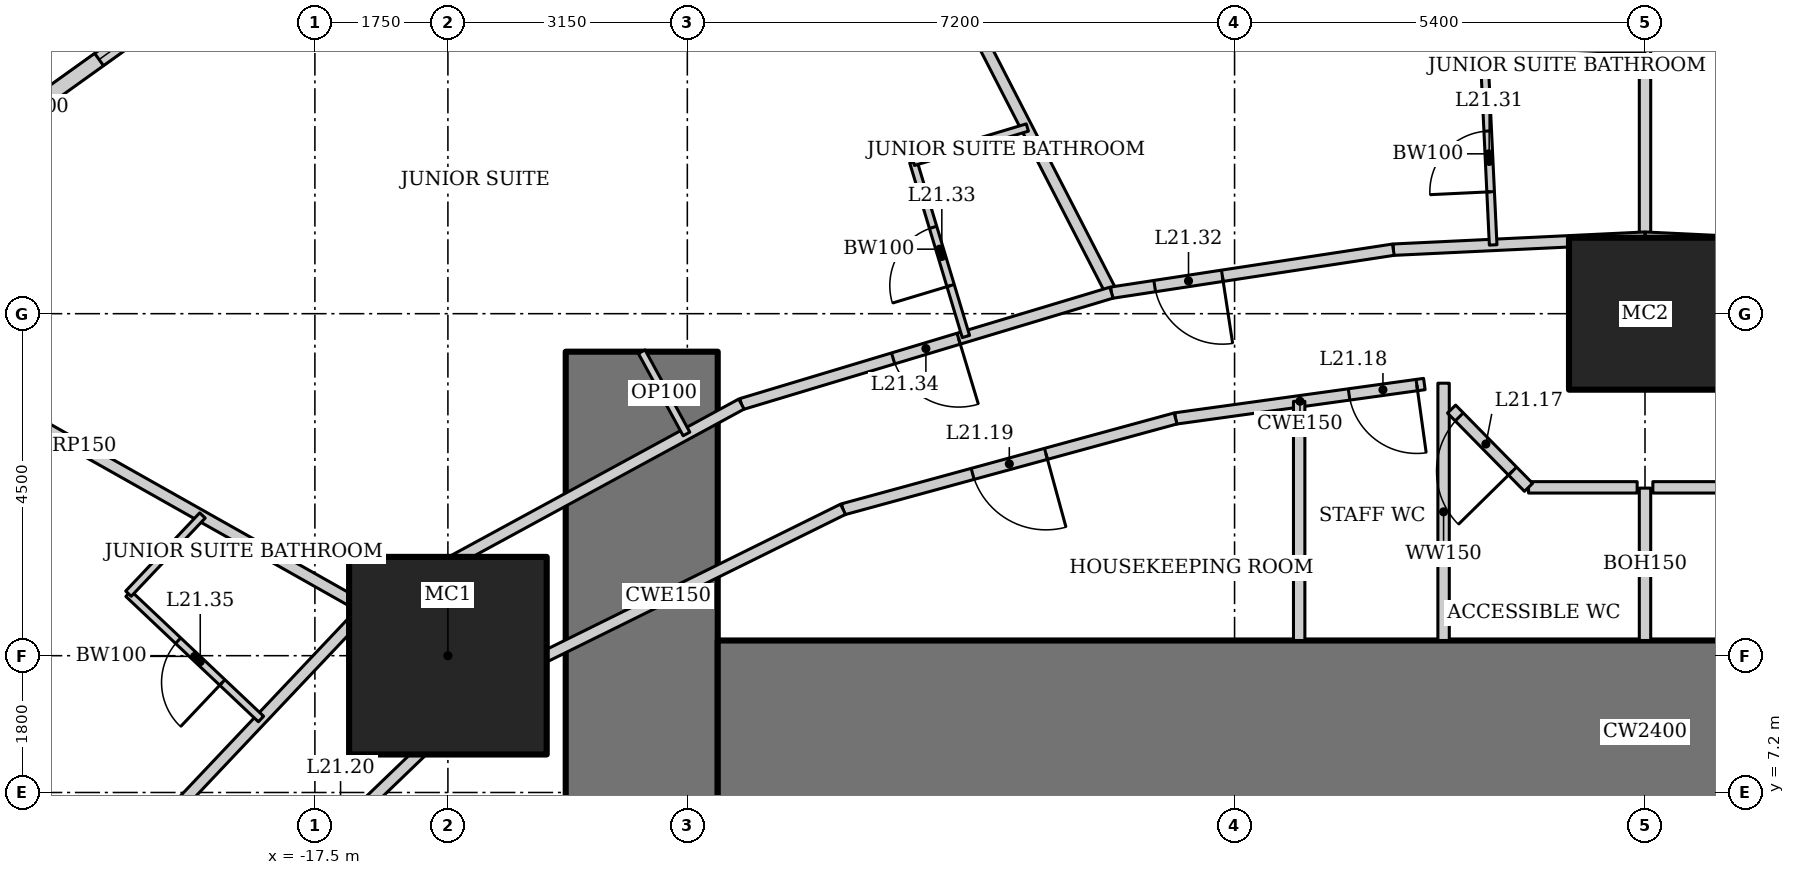
"""IFC4 building model, lengths in metres.
Left out: names, types, materials, properties, quantities, classifications, styles, units other than length and angle.
Written with IfcOpenShell. Run it as: python <this file> out.ifc"""

import sys

from ifc_helpers import new_model, si_unit, direction, frame, frame_2d, origin, origin_2d, place, context, subcontext, project, spatial, rectangle, hollow_rectangle, extrude, element, fill, save


model = new_model("IFC4")
c1 = context("Model", 3, precision=1e-05, world=origin(), true_north=direction((0.0, 1.0)))
c2 = subcontext(c1, "Body", "Model", "MODEL_VIEW")
j1 = project(units=[si_unit("LENGTHUNIT", "METRE"), si_unit("PLANEANGLEUNIT", "RADIAN")], contexts=[c1])
p1 = place(None, origin())
s1 = spatial("IfcSite", under=j1, at=p1, CompositionType="ELEMENT")
p2 = place(p1, origin())
s2 = spatial("IfcBuilding", under=s1, at=p2, CompositionType="ELEMENT")
p3 = place(p2, frame((0.0, 0.0, 91.0)))
s3 = spatial("IfcBuildingStorey", under=s2, at=p3, CompositionType="ELEMENT", Elevation=91.0)
p4 = place(p3, frame((0.0, 13.5, 0.0), z_axis=(0.0, 0.0, 1.0), x_axis=(1.0, 0.0, 0.0)))
e1 = element("IfcColumn", 1, at=p4, inside=s3, PredefinedType="COLUMN", context=c2, shape_type="SweptSolid", body=[
    extrude(hollow_rectangle(XDim=2.0, YDim=2.0, WallThickness=0.17, at=origin_2d()), origin(), (0.0, 0.0, 1.0), 3.6),
])
p5 = place(p3, frame((-15.75, 9.0, 0.0), z_axis=(0.0, 0.0, 1.0), x_axis=(1.0, 0.0, 0.0)))
e2 = element("IfcColumn", 2, at=p5, inside=s3, PredefinedType="COLUMN", context=c2, shape_type="SweptSolid", body=[
    extrude(hollow_rectangle(XDim=2.6, YDim=2.6, WallThickness=0.13, at=origin_2d()), origin(), (0.0, 0.0, 1.0), 3.6),
])
p6 = place(p3, frame((-13.2, 13.0, 0.0), z_axis=(0.0, 0.0, 1.0), x_axis=(0.0, -1.0, 0.0)))
e3 = element("IfcWall", 3, at=p6, inside=s3, PredefinedType="SHEAR", context=c2, shape_type="SweptSolid", body=[
    extrude(rectangle(XDim=26.0, YDim=2.0, at=frame_2d((13.0, 0.0))), origin(), (0.0, 0.0, 1.0), 3.6),
])
p7 = place(p6, frame((12.1, 0.0, 0.0)))
e4 = element("IfcOpeningElement", 4, at=p7, cuts=e3, PredefinedType="OPENING", context=c2, shape_type="SweptSolid", body=[
    extrude(rectangle(XDim=1.8, YDim=2.1, at=frame_2d((0.9, 1.05))), frame((0.0, 1.01, 0.0), z_axis=(0.0, -1.0, 0.0), x_axis=(1.0, 0.0, 0.0)), (0.0, 0.0, 1.0), 2.02),
])
p8 = place(p3, frame((12.2, 8.0, 0.0), z_axis=(0.0, 0.0, 1.0), x_axis=(-1.0, 0.0, 0.0)))
e5 = element("IfcWall", 5, at=p8, inside=s3, PredefinedType="SHEAR", context=c2, shape_type="SweptSolid", body=[
    extrude(rectangle(XDim=24.4, YDim=2.4, at=frame_2d((12.2, 0.0))), origin(), (0.0, 0.0, 1.0), 3.6),
])
p9 = place(p3, frame((-17.929, 18.572, 0.0), z_axis=(0.0, 0.0, 1.0), x_axis=(-0.812791321576, -0.582554948112, 0.0)))
e6 = element("IfcWall", 6, at=p9, inside=s3, PredefinedType="SOLIDWALL", context=c2, shape_type="SweptSolid", body=[
    extrude(rectangle(XDim=8.063, YDim=0.2, at=frame_2d((4.032, 0.0))), origin(), (0.0, 0.0, 1.0), 3.45),
])
p10 = place(p9, frame((1.466, 0.0, 0.5)))
e7 = element("IfcOpeningElement", 7, at=p10, cuts=e6, PredefinedType="OPENING", context=c2, shape_type="SweptSolid", body=[
    extrude(rectangle(XDim=1.5, YDim=2.2, at=frame_2d((0.75, 1.1))), frame((0.0, 0.11, 0.0), z_axis=(0.0, -1.0, 0.0), x_axis=(1.0, 0.0, 0.0)), (0.0, 0.0, 1.0), 0.22),
])
p11 = place(p9, frame((5.097, 0.0, 0.5)))
e8 = element("IfcOpeningElement", 8, at=p11, cuts=e6, PredefinedType="OPENING", context=c2, shape_type="SweptSolid", body=[
    extrude(rectangle(XDim=1.5, YDim=2.2, at=frame_2d((0.75, 1.1))), frame((0.0, 0.11, 0.0), z_axis=(0.0, -1.0, 0.0), x_axis=(1.0, 0.0, 0.0)), (0.0, 0.0, 1.0), 0.22),
])
p12 = place(p3, frame((0.0, 22.825, 0.0), z_axis=(0.0, 0.0, 1.0), x_axis=(0.0, -1.0, 0.0)))
e9 = element("IfcWall", 9, at=p12, inside=s3, PredefinedType="PARTITIONING", context=c2, shape_type="SweptSolid", body=[
    extrude(rectangle(XDim=8.325, YDim=0.15, at=frame_2d((4.162, 0.0))), origin(), (0.0, 0.0, 1.0), 2.924),
])
p13 = place(p3, frame((-10.912, 21.346, 0.0), z_axis=(0.0, 0.0, 1.0), x_axis=(0.457327273085, -0.889298468059, 0.0)))
e10 = element("IfcWall", 10, at=p13, inside=s3, PredefinedType="PARTITIONING", context=c2, shape_type="SweptSolid", body=[
    extrude(rectangle(XDim=8.511, YDim=0.15, at=frame_2d((4.256, 0.0))), origin(), (0.0, 0.0, 1.0), 2.528),
])
p14 = place(p3, frame((-24.435, 13.909, 0.0), z_axis=(0.0, 0.0, 1.0), x_axis=(0.87090601027, -0.491449612143, 0.0)))
e11 = element("IfcWall", 11, at=p14, inside=s3, PredefinedType="PARTITIONING", context=c2, shape_type="SweptSolid", body=[
    extrude(rectangle(XDim=8.726, YDim=0.15, at=frame_2d((4.363, 0.0))), origin(), (0.0, 0.0, 1.0), 2.693),
])
p15 = place(p3, frame((3.311, 14.342, 0.0), z_axis=(0.0, 0.0, 1.0), x_axis=(-0.998863968075, 0.047652631422, 0.0)))
e12 = element("IfcWall", 12, at=p15, inside=s3, PredefinedType="PARTITIONING", context=c2, shape_type="SweptSolid", body=[
    extrude(rectangle(XDim=3.315, YDim=0.15, at=frame_2d((1.657, 0.0))), origin(), (0.0, 0.0, 1.0), 3.45),
])
p16 = place(p15, frame((0.15, 0.0, 0.0)))
e13 = element("IfcOpeningElement", 13, at=p16, cuts=e12, PredefinedType="OPENING", context=c2, shape_type="SweptSolid", body=[
    extrude(rectangle(XDim=0.9, YDim=2.1, at=frame_2d((0.45, 1.05))), frame((0.0, 0.085, 0.0), z_axis=(0.0, -1.0, 0.0), x_axis=(1.0, 0.0, 0.0)), (0.0, 0.0, 1.0), 0.17),
])
p17 = place(p3, frame((0.0, 14.5, 0.0), z_axis=(0.0, 0.0, 1.0), x_axis=(-0.998863968075, -0.047652631422, 0.0)))
e14 = element("IfcWall", 14, at=p17, inside=s3, PredefinedType="PARTITIONING", context=c2, shape_type="SweptSolid", body=[
    extrude(rectangle(XDim=3.315, YDim=0.15, at=frame_2d((1.657, 0.0))), origin(), (0.0, 0.0, 1.0), 3.45),
])
p18 = place(p3, frame((-3.311, 14.342, 0.0), z_axis=(0.0, 0.0, 1.0), x_axis=(-0.988564270062, -0.150800145746, 0.0)))
e15 = element("IfcWall", 15, at=p18, inside=s3, PredefinedType="PARTITIONING", context=c2, shape_type="SweptSolid", body=[
    extrude(rectangle(XDim=3.751, YDim=0.15, at=frame_2d((1.875, 0.0))), origin(), (0.0, 0.0, 1.0), 3.45),
])
p19 = place(p18, frame((2.276, 0.0, 0.0)))
e16 = element("IfcOpeningElement", 16, at=p19, cuts=e15, PredefinedType="OPENING", context=c2, shape_type="SweptSolid", body=[
    extrude(rectangle(XDim=0.9, YDim=2.1, at=frame_2d((0.45, 1.05))), frame((0.0, 0.085, 0.0), z_axis=(0.0, -1.0, 0.0), x_axis=(1.0, 0.0, 0.0)), (0.0, 0.0, 1.0), 0.17),
])
p20 = place(p3, frame((-7.019, 13.776, 0.0), z_axis=(0.0, 0.0, 1.0), x_axis=(-0.957564241242, -0.288219922793, 0.0)))
e17 = element("IfcWall", 17, at=p20, inside=s3, PredefinedType="PARTITIONING", context=c2, shape_type="SweptSolid", body=[
    extrude(rectangle(XDim=5.085, YDim=0.15, at=frame_2d((2.542, 0.0))), origin(), (0.0, 0.0, 1.0), 3.45),
])
p21 = place(p20, frame((2.1, 0.0, 0.0)))
e18 = element("IfcOpeningElement", 18, at=p21, cuts=e17, PredefinedType="OPENING", context=c2, shape_type="SweptSolid", body=[
    extrude(rectangle(XDim=0.9, YDim=2.1, at=frame_2d((0.45, 1.05))), frame((0.0, 0.085, 0.0), z_axis=(0.0, -1.0, 0.0), x_axis=(1.0, 0.0, 0.0)), (0.0, 0.0, 1.0), 0.17),
])
p22 = place(p3, frame((-11.888, 12.311, 0.0), z_axis=(0.0, 0.0, 1.0), x_axis=(-0.878450059298, -0.477834169267, 0.0)))
e19 = element("IfcWall", 19, at=p22, inside=s3, PredefinedType="PARTITIONING", context=c2, shape_type="SweptSolid", body=[
    extrude(rectangle(XDim=5.631, YDim=0.15, at=frame_2d((2.815, 0.0))), origin(), (0.0, 0.0, 1.0), 3.45),
])
p23 = place(p3, frame((-16.835, 9.62, 0.0), z_axis=(0.0, 0.0, 1.0), x_axis=(-0.687062608696, -0.726598218916, 0.0)))
e20 = element("IfcWall", 20, at=p23, inside=s3, PredefinedType="PARTITIONING", context=c2, shape_type="SweptSolid", body=[
    extrude(rectangle(XDim=6.039, YDim=0.15, at=frame_2d((3.02, 0.0))), origin(), (0.0, 0.0, 1.0), 3.45),
])
p24 = place(p3, frame((-2.903, 12.574, 0.0), z_axis=(0.0, 0.0, 1.0), x_axis=(-0.990563451353, -0.137054911782, 0.0)))
e21 = element("IfcWall", 21, at=p24, inside=s3, PredefinedType="PARTITIONING", context=c2, shape_type="SweptSolid", body=[
    extrude(rectangle(XDim=3.304, YDim=0.15, at=frame_2d((1.652, 0.0))), origin(), (0.0, 0.0, 1.0), 3.45),
])
p25 = place(p24, frame((0.1, 0.0, 0.0)))
e22 = element("IfcOpeningElement", 22, at=p25, cuts=e21, PredefinedType="OPENING", context=c2, shape_type="SweptSolid", body=[
    extrude(rectangle(XDim=0.9, YDim=2.1, at=frame_2d((0.45, 1.05))), frame((0.0, 0.085, 0.0), z_axis=(0.0, -1.0, 0.0), x_axis=(1.0, 0.0, 0.0)), (0.0, 0.0, 1.0), 0.17),
])
p26 = place(p3, frame((-6.176, 12.122, 0.0), z_axis=(0.0, 0.0, 1.0), x_axis=(-0.964644466646, -0.263554648923, 0.0)))
e23 = element("IfcWall", 23, at=p26, inside=s3, PredefinedType="PARTITIONING", context=c2, shape_type="SweptSolid", body=[
    extrude(rectangle(XDim=4.535, YDim=0.15, at=frame_2d((2.268, 0.0))), origin(), (0.0, 0.0, 1.0), 3.45),
])
p27 = place(p26, frame((1.768, 0.0, 0.0)))
e24 = element("IfcOpeningElement", 24, at=p27, cuts=e23, PredefinedType="OPENING", context=c2, shape_type="SweptSolid", body=[
    extrude(rectangle(XDim=1.0, YDim=2.1, at=frame_2d((0.5, 1.05))), frame((0.0, 0.085, 0.0), z_axis=(0.0, -1.0, 0.0), x_axis=(1.0, 0.0, 0.0)), (0.0, 0.0, 1.0), 0.17),
])
p28 = place(p3, frame((-10.551, 10.926, 0.0), z_axis=(0.0, 0.0, 1.0), x_axis=(-0.89656943448, -0.442903205177, 0.0)))
e25 = element("IfcWall", 25, at=p28, inside=s3, PredefinedType="PARTITIONING", context=c2, shape_type="SweptSolid", body=[
    extrude(rectangle(XDim=5.126, YDim=0.15, at=frame_2d((2.563, 0.0))), origin(), (0.0, 0.0, 1.0), 3.45),
])
p29 = place(p3, frame((-15.147, 8.656, 0.0), z_axis=(0.0, 0.0, 1.0), x_axis=(-0.720837261072, -0.693104352209, 0.0)))
e26 = element("IfcWall", 26, at=p29, inside=s3, PredefinedType="PARTITIONING", context=c2, shape_type="SweptSolid", body=[
    extrude(rectangle(XDim=5.59, YDim=0.15, at=frame_2d((2.795, 0.0))), origin(), (0.0, 0.0, 1.0), 3.45),
])
p30 = place(p29, frame((2.295, 0.0, 0.0)))
e27 = element("IfcOpeningElement", 27, at=p30, cuts=e26, PredefinedType="OPENING", context=c2, shape_type="SweptSolid", body=[
    extrude(rectangle(XDim=1.0, YDim=2.1, at=frame_2d((0.5, 1.05))), frame((0.0, 0.085, 0.0), z_axis=(0.0, -1.0, 0.0), x_axis=(1.0, 0.0, 0.0)), (0.0, 0.0, 1.0), 0.17),
])
p31 = place(p3, frame((-2.65, 9.2, 0.0), z_axis=(0.0, 0.0, 1.0), x_axis=(0.0, 1.0, 0.0)))
e28 = element("IfcWall", 28, at=p31, inside=s3, PredefinedType="SOLIDWALL", context=c2, shape_type="SweptSolid", body=[
    extrude(rectangle(XDim=3.385, YDim=0.15, at=frame_2d((1.693, 0.0))), origin(), (0.0, 0.0, 1.0), 2.767),
])
p32 = place(p3, frame((-4.55, 9.2, 0.0), z_axis=(0.0, 0.0, 1.0), x_axis=(0.0, 1.0, 0.0)))
e29 = element("IfcWall", 29, at=p32, inside=s3, PredefinedType="SOLIDWALL", context=c2, shape_type="SweptSolid", body=[
    extrude(rectangle(XDim=3.147, YDim=0.15, at=frame_2d((1.573, 0.0))), origin(), (0.0, 0.0, 1.0), 3.45),
])
p33 = place(p3, frame((-1.998, 14.405, 0.0), z_axis=(0.0, 0.0, 1.0), x_axis=(-0.047608648396, 0.998866065395, 0.0)))
e30 = element("IfcWall", 30, at=p33, inside=s3, PredefinedType="PARTITIONING", context=c2, shape_type="SweptSolid", body=[
    extrude(rectangle(XDim=2.4, YDim=0.1, at=frame_2d((1.2, 0.0))), origin(), (0.0, 0.0, 1.0), 2.749),
])
p34 = place(p33, frame((0.7, 0.0, 0.0)))
e31 = element("IfcOpeningElement", 31, at=p34, cuts=e30, PredefinedType="OPENING", context=c2, shape_type="SweptSolid", body=[
    extrude(rectangle(XDim=0.8, YDim=2.1, at=frame_2d((0.4, 1.05))), frame((0.0, 0.06, 0.0), z_axis=(0.0, -1.0, 0.0), x_axis=(1.0, 0.0, 0.0)), (0.0, 0.0, 1.0), 0.12),
])
p35 = place(p3, frame((-2.112, 16.802, 0.0), z_axis=(0.0, 0.0, 1.0), x_axis=(0.998862383453, 0.047685835668, 0.0)))
e32 = element("IfcWall", 32, at=p35, inside=s3, PredefinedType="PARTITIONING", context=c2, shape_type="SweptSolid", body=[
    extrude(rectangle(XDim=2.115, YDim=0.1, at=frame_2d((1.057, 0.0))), origin(), (0.0, 0.0, 1.0), 3.45),
])
p36 = place(p3, frame((-8.935, 13.2, 0.0), z_axis=(0.0, 0.0, 1.0), x_axis=(-0.288197066254, 0.957571120598, 0.0)))
e33 = element("IfcWall", 33, at=p36, inside=s3, PredefinedType="PARTITIONING", context=c2, shape_type="SweptSolid", body=[
    extrude(rectangle(XDim=2.4, YDim=0.1, at=frame_2d((1.2, 0.0))), origin(), (0.0, 0.0, 1.0), 3.45),
])
p37 = place(p36, frame((0.7, 0.0, 0.0)))
e34 = element("IfcOpeningElement", 34, at=p37, cuts=e33, PredefinedType="OPENING", context=c2, shape_type="SweptSolid", body=[
    extrude(rectangle(XDim=0.8, YDim=2.1, at=frame_2d((0.4, 1.05))), frame((0.0, 0.06, 0.0), z_axis=(0.0, -1.0, 0.0), x_axis=(1.0, 0.0, 0.0)), (0.0, 0.0, 1.0), 0.12),
])
p38 = place(p3, frame((-9.626, 15.498, 0.0), z_axis=(0.0, 0.0, 1.0), x_axis=(0.957551231109, 0.288263143328, 0.0)))
e35 = element("IfcWall", 35, at=p38, inside=s3, PredefinedType="PARTITIONING", context=c2, shape_type="SweptSolid", body=[
    extrude(rectangle(XDim=1.566, YDim=0.1, at=frame_2d((0.783, 0.0))), origin(), (0.0, 0.0, 1.0), 3.45),
])
p39 = place(p3, frame((-18.209, 8.167, 0.0), z_axis=(0.0, 0.0, 1.0), x_axis=(-0.726567238928, 0.687095369885, 0.0)))
e36 = element("IfcWall", 36, at=p39, inside=s3, PredefinedType="PARTITIONING", context=c2, shape_type="SweptSolid", body=[
    extrude(rectangle(XDim=2.4, YDim=0.1, at=frame_2d((1.2, 0.0))), origin(), (0.0, 0.0, 1.0), 3.45),
])
p40 = place(p39, frame((0.7, 0.0, 0.0)))
e37 = element("IfcOpeningElement", 37, at=p40, cuts=e36, PredefinedType="OPENING", context=c2, shape_type="SweptSolid", body=[
    extrude(rectangle(XDim=0.8, YDim=2.1, at=frame_2d((0.4, 1.05))), frame((0.0, 0.06, 0.0), z_axis=(0.0, -1.0, 0.0), x_axis=(1.0, 0.0, 0.0)), (0.0, 0.0, 1.0), 0.12),
])
p41 = place(p3, frame((-19.953, 9.816, 0.0), z_axis=(0.0, 0.0, 1.0), x_axis=(0.687017997787, 0.726640399866, 0.0)))
e38 = element("IfcWall", 38, at=p41, inside=s3, PredefinedType="PARTITIONING", context=c2, shape_type="SweptSolid", body=[
    extrude(rectangle(XDim=1.417, YDim=0.1, at=frame_2d((0.708, 0.0))), origin(), (0.0, 0.0, 1.0), 3.45),
])
p42 = place(p3, frame((-13.2, 13.0, 0.0), z_axis=(0.0, 0.0, 1.0), x_axis=(0.477852414256, -0.878440134665, 0.0)))
e39 = element("IfcWall", 39, at=p42, inside=s3, PredefinedType="PARTITIONING", context=c2, shape_type="SweptSolid", body=[
    extrude(rectangle(XDim=1.232, YDim=0.1, at=frame_2d((0.616, 0.0))), origin(), (0.0, 0.0, 1.0), 3.45),
])
p43 = place(p3, frame((0.0, 9.2, 0.0), z_axis=(0.0, 0.0, 1.0), x_axis=(0.0, 1.0, 0.0)))
e40 = element("IfcWall", 40, at=p43, inside=s3, PredefinedType="PARTITIONING", context=c2, shape_type="SweptSolid", body=[
    extrude(rectangle(XDim=2.005, YDim=0.15, at=frame_2d((1.002, 0.0))), origin(), (0.0, 0.0, 1.0), 3.044),
])
for number, where, z_axis, x_axis in (
    (41, (1.532, 11.215, 0.0), (0.0, 0.0, 1.0), (-1.0, 0.0, 0.0)),
    (42, (-0.103, 11.215, 0.0), (0.0, 0.0, 1.0), (-1.0, 0.0, 0.0)),
):
    element("IfcWall", number, at=place(p3, frame(where, z_axis=z_axis, x_axis=x_axis)), inside=s3, PredefinedType="PARTITIONING", context=c2, shape_type="SweptSolid", body=[
        extrude(rectangle(XDim=1.429, YDim=0.15, at=frame_2d((0.714, 0.0))), origin(), (0.0, 0.0, 1.0), 3.45),
    ])
p44 = place(p3, frame((-1.532, 11.215, 0.0), z_axis=(0.0, 0.0, 1.0), x_axis=(-0.701250244986, 0.712915208077, 0.0)))
e43 = element("IfcWall", 43, at=p44, inside=s3, PredefinedType="PARTITIONING", context=c2, shape_type="SweptSolid", body=[
    extrude(rectangle(XDim=1.444, YDim=0.15, at=frame_2d((0.722, 0.0))), origin(), (0.0, 0.0, 1.0), 3.45),
])
p45 = place(p44, frame((0.3, 0.0, 0.0)))
e44 = element("IfcOpeningElement", 44, at=p45, cuts=e43, PredefinedType="OPENING", context=c2, shape_type="SweptSolid", body=[
    extrude(rectangle(XDim=1.0, YDim=2.1, at=frame_2d((0.5, 1.05))), frame((0.0, 0.085, 0.0), z_axis=(0.0, -1.0, 0.0), x_axis=(1.0, 0.0, 0.0)), (0.0, 0.0, 1.0), 0.17),
])
p46 = place(p10, origin())
e45 = element("IfcWindow", 45, at=p46, inside=s3, PartitioningType="SINGLE_PANEL", PredefinedType="WINDOW", context=c2, shape_type="SweptSolid", body=[
    extrude(rectangle(XDim=1.5, YDim=2.2, at=frame_2d((0.75, 1.1))), frame((0.0, 0.03, 0.0), z_axis=(0.0, -1.0, 0.0), x_axis=(1.0, 0.0, 0.0)), (0.0, 0.0, 1.0), 0.06),
])
fill(e7, e45)
p47 = place(p45, origin())
e46 = element("IfcDoor", 46, at=p47, inside=s3, OperationType="SINGLE_SWING_LEFT", PredefinedType="DOOR", context=c2, shape_type="SweptSolid", body=[
    extrude(rectangle(XDim=1.0, YDim=2.1, at=frame_2d((0.5, 1.05))), frame((0.0, 0.025, 0.0), z_axis=(0.0, -1.0, 0.0), x_axis=(1.0, 0.0, 0.0)), (0.0, 0.0, 1.0), 0.05),
])
fill(e44, e46)
p48 = place(p25, origin())
e47 = element("IfcDoor", 47, at=p48, inside=s3, OperationType="SINGLE_SWING_LEFT", PredefinedType="DOOR", context=c2, shape_type="SweptSolid", body=[
    extrude(rectangle(XDim=0.9, YDim=2.1, at=frame_2d((0.45, 1.05))), frame((0.0, 0.025, 0.0), z_axis=(0.0, -1.0, 0.0), x_axis=(1.0, 0.0, 0.0)), (0.0, 0.0, 1.0), 0.05),
])
fill(e22, e47)
p49 = place(p27, origin())
e48 = element("IfcDoor", 48, at=p49, inside=s3, OperationType="SINGLE_SWING_LEFT", PredefinedType="DOOR", context=c2, shape_type="SweptSolid", body=[
    extrude(rectangle(XDim=1.0, YDim=2.1, at=frame_2d((0.5, 1.05))), frame((0.0, 0.025, 0.0), z_axis=(0.0, -1.0, 0.0), x_axis=(1.0, 0.0, 0.0)), (0.0, 0.0, 1.0), 0.05),
])
fill(e24, e48)
p50 = place(p34, origin())
e49 = element("IfcDoor", 49, at=p50, inside=s3, OperationType="SINGLE_SWING_LEFT", PredefinedType="DOOR", context=c2, shape_type="SweptSolid", body=[
    extrude(rectangle(XDim=0.8, YDim=2.1, at=frame_2d((0.4, 1.05))), frame((0.0, 0.025, 0.0), z_axis=(0.0, -1.0, 0.0), x_axis=(1.0, 0.0, 0.0)), (0.0, 0.0, 1.0), 0.05),
])
fill(e31, e49)
p51 = place(p19, origin())
e50 = element("IfcDoor", 50, at=p51, inside=s3, OperationType="SINGLE_SWING_LEFT", PredefinedType="DOOR", context=c2, shape_type="SweptSolid", body=[
    extrude(rectangle(XDim=0.9, YDim=2.1, at=frame_2d((0.45, 1.05))), frame((0.0, 0.025, 0.0), z_axis=(0.0, -1.0, 0.0), x_axis=(1.0, 0.0, 0.0)), (0.0, 0.0, 1.0), 0.05),
])
fill(e16, e50)
p52 = place(p37, origin())
e51 = element("IfcDoor", 51, at=p52, inside=s3, OperationType="SINGLE_SWING_LEFT", PredefinedType="DOOR", context=c2, shape_type="SweptSolid", body=[
    extrude(rectangle(XDim=0.8, YDim=2.1, at=frame_2d((0.4, 1.05))), frame((0.0, 0.025, 0.0), z_axis=(0.0, -1.0, 0.0), x_axis=(1.0, 0.0, 0.0)), (0.0, 0.0, 1.0), 0.05),
])
fill(e34, e51)
p53 = place(p21, origin())
e52 = element("IfcDoor", 52, at=p53, inside=s3, OperationType="SINGLE_SWING_LEFT", PredefinedType="DOOR", context=c2, shape_type="SweptSolid", body=[
    extrude(rectangle(XDim=0.9, YDim=2.1, at=frame_2d((0.45, 1.05))), frame((0.0, 0.025, 0.0), z_axis=(0.0, -1.0, 0.0), x_axis=(1.0, 0.0, 0.0)), (0.0, 0.0, 1.0), 0.05),
])
fill(e18, e52)
p54 = place(p40, origin())
e53 = element("IfcDoor", 53, at=p54, inside=s3, OperationType="SINGLE_SWING_LEFT", PredefinedType="DOOR", context=c2, shape_type="SweptSolid", body=[
    extrude(rectangle(XDim=0.8, YDim=2.1, at=frame_2d((0.4, 1.05))), frame((0.0, 0.025, 0.0), z_axis=(0.0, -1.0, 0.0), x_axis=(1.0, 0.0, 0.0)), (0.0, 0.0, 1.0), 0.05),
])
fill(e37, e53)
save(model, sys.argv[1])
